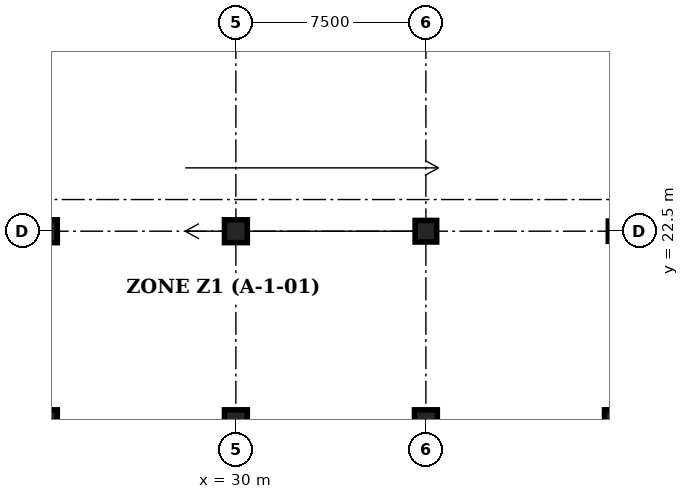
"""IFC4 building model, lengths in metres.
Left out: names, types, materials, properties, quantities, classifications, styles, units other than length and angle.
Written with IfcOpenShell. Run it as: python <this file> out.ifc"""

import sys

from ifc_helpers import new_model, si_unit, direction, frame, origin, origin_2d, place, context, subcontext, project, spatial, rectangle, circle, extrude, element, save


model = new_model("IFC4")
c1 = context("Model", 3, precision=1e-05, world=origin(), true_north=direction((0.0, 1.0)))
c2 = subcontext(c1, "Body", "Model", "MODEL_VIEW")
j1 = project(units=[si_unit("LENGTHUNIT", "METRE"), si_unit("PLANEANGLEUNIT", "RADIAN")], contexts=[c1])
p1 = place(None, origin())
s1 = spatial("IfcSite", under=j1, at=p1, CompositionType="ELEMENT")
p2 = place(p1, origin())
s2 = spatial("IfcBuilding", under=s1, at=p2, CompositionType="ELEMENT")
p3 = place(p2, frame((0.0, 0.0, -4.5)))
s3 = spatial("IfcBuildingStorey", under=s2, at=p3, CompositionType="ELEMENT", Elevation=-4.5)
p4 = place(p3, frame((22.5, 15.0, 0.0), z_axis=(0.0, 0.0, 1.0), x_axis=(1.0, 0.0, 0.0)))
e1 = element("IfcColumn", 1, at=p4, inside=s3, PredefinedType="COLUMN", context=c2, shape_type="SweptSolid", body=[
    extrude(rectangle(XDim=0.9, YDim=0.9, at=origin_2d()), origin(), (0.0, 0.0, 1.0), 4.5),
])
for number, where, z_axis, x_axis in (
    (2, (22.5, 22.5, 0.0), (0.0, 0.0, 1.0), (1.0, 0.0, 0.0)),
    (3, (30.0, 15.0, 0.0), (0.0, 0.0, 1.0), (1.0, 0.0, 0.0)),
):
    element("IfcColumn", number, at=place(p3, frame(where, z_axis=z_axis, x_axis=x_axis)), inside=s3, PredefinedType="COLUMN", context=c2, shape_type="SweptSolid", body=[
        extrude(circle(Radius=0.45, at=origin_2d()), origin(), (0.0, 0.0, 1.0), 4.5),
    ])
for number, where, z_axis, x_axis in (
    (4, (30.0, 22.5, 0.0), (0.0, 0.0, 1.0), (1.0, 0.0, 0.0)),
    (5, (37.5, 15.0, 0.0), (0.0, 0.0, 1.0), (1.0, 0.0, 0.0)),
):
    element("IfcColumn", number, at=place(p3, frame(where, z_axis=z_axis, x_axis=x_axis)), inside=s3, PredefinedType="COLUMN", context=c2, shape_type="SweptSolid", body=[
        extrude(rectangle(XDim=0.9, YDim=0.9, at=origin_2d()), origin(), (0.0, 0.0, 1.0), 4.5),
    ])
p5 = place(p3, frame((37.5, 22.5, 0.0), z_axis=(0.0, 0.0, 1.0), x_axis=(1.0, 0.0, 0.0)))
e6 = element("IfcColumn", 6, at=p5, inside=s3, PredefinedType="COLUMN", context=c2, shape_type="SweptSolid", body=[
    extrude(rectangle(XDim=0.85, YDim=0.85, at=origin_2d()), origin(), (0.0, 0.0, 1.0), 4.5),
])
p6 = place(p3, frame((45.0, 15.0, 0.0), z_axis=(0.0, 0.0, 1.0), x_axis=(1.0, 0.0, 0.0)))
e7 = element("IfcColumn", 7, at=p6, inside=s3, PredefinedType="COLUMN", context=c2, shape_type="SweptSolid", body=[
    extrude(rectangle(XDim=0.9, YDim=0.9, at=origin_2d()), origin(), (0.0, 0.0, 1.0), 4.5),
])
p7 = place(p3, frame((45.0, 22.5, 0.0), z_axis=(0.0, 0.0, 1.0), x_axis=(1.0, 0.0, 0.0)))
e8 = element("IfcColumn", 8, at=p7, inside=s3, PredefinedType="COLUMN", context=c2, shape_type="SweptSolid", body=[
    extrude(rectangle(XDim=0.6, YDim=0.8, at=origin_2d()), origin(), (0.0, 0.0, 1.0), 4.5),
])
save(model, sys.argv[1])
